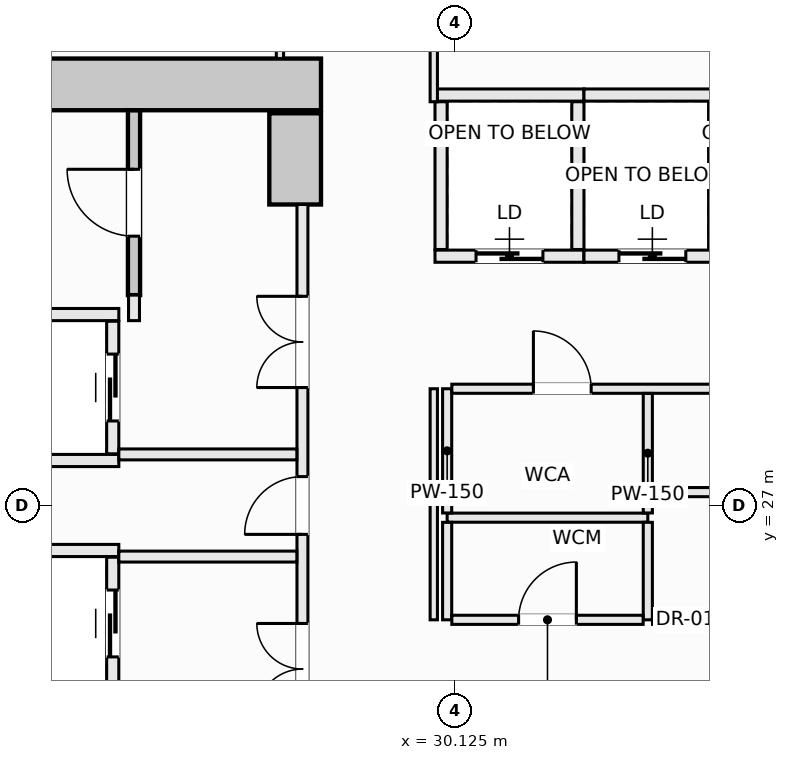
"""IFC4 building model, lengths in metres.
Left out: names, types, materials, properties, quantities, classifications, styles, units other than length and angle.
Written with IfcOpenShell. Run it as: python <this file> out.ifc"""

import sys

from ifc_helpers import new_model, si_unit, direction, frame, frame_2d, origin, place, context, subcontext, project, spatial, rectangle, extrude, element, fill, save


model = new_model("IFC4")
c1 = context("Model", 3, precision=1e-05, world=origin(), true_north=direction((0.0, 1.0)))
c2 = subcontext(c1, "Body", "Model", "MODEL_VIEW")
j1 = project(units=[si_unit("LENGTHUNIT", "METRE"), si_unit("PLANEANGLEUNIT", "RADIAN")], contexts=[c1])
p1 = place(None, origin())
s1 = spatial("IfcSite", under=j1, at=p1, CompositionType="ELEMENT")
p2 = place(p1, origin())
s2 = spatial("IfcBuilding", under=s1, at=p2, CompositionType="ELEMENT")
p3 = place(p2, frame((0.0, 0.0, 53.45)))
s3 = spatial("IfcBuildingStorey", under=s2, at=p3, CompositionType="ELEMENT", Elevation=53.45)
p4 = place(p3, frame((14.075, 33.925, -0.28), z_axis=(0.0, 0.0, 1.0), x_axis=(1.0, 0.0, 0.0)))
e1 = element("IfcWall", 1, at=p4, inside=s3, PredefinedType="SHEAR", context=c2, shape_type="SweptSolid", body=[
    extrude(rectangle(XDim=13.85, YDim=0.85, at=frame_2d((6.925, 0.0))), origin(), (0.0, 0.0, 1.0), 3.85),
])
p5 = place(p3, frame((27.5, 31.95, -0.28), z_axis=(0.0, 0.0, 1.0), x_axis=(0.0, 1.0, 0.0)))
e2 = element("IfcWall", 2, at=p5, inside=s3, PredefinedType="SHEAR", context=c2, shape_type="SweptSolid", body=[
    extrude(rectangle(XDim=1.5, YDim=0.85, at=frame_2d((0.75, 0.0))), origin(), (0.0, 0.0, 1.0), 3.85),
])
p6 = place(p3, frame((24.85, 30.46, -0.28), z_axis=(0.0, 0.0, 1.0), x_axis=(0.0, 1.0, 0.0)))
e3 = element("IfcWall", 3, at=p6, inside=s3, PredefinedType="SHEAR", context=c2, shape_type="SweptSolid", body=[
    extrude(rectangle(XDim=3.038, YDim=0.2, at=frame_2d((1.519, 0.0))), origin(), (0.0, 0.0, 1.0), 3.85),
])
p7 = place(p6, frame((0.969, 0.0, 0.28)))
e4 = element("IfcOpeningElement", 4, at=p7, cuts=e3, PredefinedType="OPENING", context=c2, shape_type="SweptSolid", body=[
    extrude(rectangle(XDim=1.1, YDim=2.15, at=frame_2d((0.55, 1.075))), frame((0.0, 0.11, 0.0), z_axis=(0.0, -1.0, 0.0), x_axis=(1.0, 0.0, 0.0)), (0.0, 0.0, 1.0), 0.22),
])
for number, where, z_axis, x_axis in (
    (5, (22.15, 30.14, 0.0), (0.0, 0.0, 1.0), (1.0, 0.0, 0.0)),
    (6, (22.15, 27.74, 0.0), (0.0, 0.0, 1.0), (1.0, 0.0, 0.0)),
):
    element("IfcWall", number, at=place(p3, frame(where, z_axis=z_axis, x_axis=x_axis)), inside=s3, PredefinedType="SOLIDWALL", context=c2, shape_type="SweptSolid", body=[
        extrude(rectangle(XDim=2.45, YDim=0.2, at=frame_2d((1.225, 0.0))), origin(), (0.0, 0.0, 1.0), 3.57),
    ])
p8 = place(p3, frame((24.5, 27.85, 0.0), z_axis=(0.0, 0.0, 1.0), x_axis=(0.0, 1.0, 0.0)))
e7 = element("IfcWall", 7, at=p8, inside=s3, PredefinedType="SOLIDWALL", context=c2, shape_type="SweptSolid", body=[
    extrude(rectangle(XDim=2.18, YDim=0.2, at=frame_2d((1.09, 0.0))), origin(), (0.0, 0.0, 1.0), 3.57),
])
p9 = place(p8, frame((0.54, 0.0, 0.0)))
e8 = element("IfcOpeningElement", 8, at=p9, cuts=e7, PredefinedType="OPENING", context=c2, shape_type="SweptSolid", body=[
    extrude(rectangle(XDim=1.1, YDim=2.2, at=frame_2d((0.55, 1.1))), frame((0.0, 0.11, 0.0), z_axis=(0.0, -1.0, 0.0), x_axis=(1.0, 0.0, 0.0)), (0.0, 0.0, 1.0), 0.22),
])
p10 = place(p3, frame((22.15, 26.26, 0.0), z_axis=(0.0, 0.0, 1.0), x_axis=(1.0, 0.0, 0.0)))
e9 = element("IfcWall", 9, at=p10, inside=s3, PredefinedType="SOLIDWALL", context=c2, shape_type="SweptSolid", body=[
    extrude(rectangle(XDim=2.45, YDim=0.2, at=frame_2d((1.225, 0.0))), origin(), (0.0, 0.0, 1.0), 3.57),
])
p11 = place(p3, frame((24.5, 23.97, 0.0), z_axis=(0.0, 0.0, 1.0), x_axis=(0.0, 1.0, 0.0)))
e10 = element("IfcWall", 10, at=p11, inside=s3, PredefinedType="SOLIDWALL", context=c2, shape_type="SweptSolid", body=[
    extrude(rectangle(XDim=2.18, YDim=0.2, at=frame_2d((1.09, 0.0))), origin(), (0.0, 0.0, 1.0), 3.57),
])
p12 = place(p11, frame((0.54, 0.0, 0.0)))
e11 = element("IfcOpeningElement", 11, at=p12, cuts=e10, PredefinedType="OPENING", context=c2, shape_type="SweptSolid", body=[
    extrude(rectangle(XDim=1.1, YDim=2.2, at=frame_2d((0.55, 1.1))), frame((0.0, 0.11, 0.0), z_axis=(0.0, -1.0, 0.0), x_axis=(1.0, 0.0, 0.0)), (0.0, 0.0, 1.0), 0.22),
])
p13 = place(p3, frame((29.8, 33.75, 0.0), z_axis=(0.0, 0.0, 1.0), x_axis=(1.0, 0.0, 0.0)))
e12 = element("IfcWall", 12, at=p13, inside=s3, PredefinedType="SOLIDWALL", context=c2, shape_type="SweptSolid", body=[
    extrude(rectangle(XDim=2.45, YDim=0.2, at=frame_2d((1.225, 0.0))), origin(), (0.0, 0.0, 1.0), 3.57),
])
p14 = place(p3, frame((29.8, 31.1, 0.0), z_axis=(0.0, 0.0, 1.0), x_axis=(1.0, 0.0, 0.0)))
e13 = element("IfcWall", 13, at=p14, inside=s3, PredefinedType="SOLIDWALL", context=c2, shape_type="SweptSolid", body=[
    extrude(rectangle(XDim=2.45, YDim=0.2, at=frame_2d((1.225, 0.0))), origin(), (0.0, 0.0, 1.0), 3.57),
])
p15 = place(p14, frame((0.675, 0.0, 0.0)))
e14 = element("IfcOpeningElement", 14, at=p15, cuts=e13, PredefinedType="OPENING", context=c2, shape_type="SweptSolid", body=[
    extrude(rectangle(XDim=1.1, YDim=2.2, at=frame_2d((0.55, 1.1))), frame((0.0, 0.11, 0.0), z_axis=(0.0, -1.0, 0.0), x_axis=(1.0, 0.0, 0.0)), (0.0, 0.0, 1.0), 0.22),
])
for number, where, z_axis, x_axis in (
    (15, (29.9, 31.21, 0.0), (0.0, 0.0, 1.0), (0.0, 1.0, 0.0)),
    (16, (32.15, 31.21, 0.0), (0.0, 0.0, 1.0), (0.0, 1.0, 0.0)),
):
    element("IfcWall", number, at=place(p3, frame(where, z_axis=z_axis, x_axis=x_axis)), inside=s3, PredefinedType="SOLIDWALL", context=c2, shape_type="SweptSolid", body=[
        extrude(rectangle(XDim=2.43, YDim=0.2, at=frame_2d((1.215, 0.0))), origin(), (0.0, 0.0, 1.0), 3.57),
    ])
p16 = place(p3, frame((32.25, 33.75, 0.0), z_axis=(0.0, 0.0, 1.0), x_axis=(1.0, 0.0, 0.0)))
e17 = element("IfcWall", 17, at=p16, inside=s3, PredefinedType="SOLIDWALL", context=c2, shape_type="SweptSolid", body=[
    extrude(rectangle(XDim=2.25, YDim=0.2, at=frame_2d((1.125, 0.0))), origin(), (0.0, 0.0, 1.0), 3.57),
])
p17 = place(p3, frame((32.25, 31.1, 0.0), z_axis=(0.0, 0.0, 1.0), x_axis=(1.0, 0.0, 0.0)))
e18 = element("IfcWall", 18, at=p17, inside=s3, PredefinedType="SOLIDWALL", context=c2, shape_type="SweptSolid", body=[
    extrude(rectangle(XDim=2.25, YDim=0.2, at=frame_2d((1.125, 0.0))), origin(), (0.0, 0.0, 1.0), 3.57),
])
p18 = place(p17, frame((0.575, 0.0, 0.0)))
e19 = element("IfcOpeningElement", 19, at=p18, cuts=e18, PredefinedType="OPENING", context=c2, shape_type="SweptSolid", body=[
    extrude(rectangle(XDim=1.1, YDim=2.2, at=frame_2d((0.55, 1.1))), frame((0.0, 0.11, 0.0), z_axis=(0.0, -1.0, 0.0), x_axis=(1.0, 0.0, 0.0)), (0.0, 0.0, 1.0), 0.22),
])
p19 = place(p3, frame((34.4, 31.21, 0.0), z_axis=(0.0, 0.0, 1.0), x_axis=(0.0, 1.0, 0.0)))
e20 = element("IfcWall", 20, at=p19, inside=s3, PredefinedType="SOLIDWALL", context=c2, shape_type="SweptSolid", body=[
    extrude(rectangle(XDim=2.43, YDim=0.2, at=frame_2d((1.215, 0.0))), origin(), (0.0, 0.0, 1.0), 3.57),
])
p20 = place(p3, frame((24.85, 30.04, 0.0), z_axis=(0.0, 0.0, 1.0), x_axis=(0.0, 1.0, 0.0)))
e21 = element("IfcWall", 21, at=p20, inside=s3, PredefinedType="SOLIDWALL", context=c2, shape_type="SweptSolid", body=[
    extrude(rectangle(XDim=0.42, YDim=0.18, at=frame_2d((0.21, 0.0))), origin(), (0.0, 0.0, 1.0), 3.57),
])
p21 = place(p3, frame((27.62, 22.05, 0.0), z_axis=(0.0, 0.0, 1.0), x_axis=(0.0, 1.0, 0.0)))
e22 = element("IfcWall", 22, at=p21, inside=s3, PredefinedType="SOLIDWALL", context=c2, shape_type="SweptSolid", body=[
    extrude(rectangle(XDim=9.9, YDim=0.18, at=frame_2d((4.95, 0.0))), origin(), (0.0, 0.0, 1.0), 2.662),
])
p22 = place(p21, frame((4.475, 0.0, 0.0)))
e23 = element("IfcOpeningElement", 23, at=p22, cuts=e22, PredefinedType="OPENING", context=c2, shape_type="SweptSolid", body=[
    extrude(rectangle(XDim=0.95, YDim=2.1, at=frame_2d((0.475, 1.05))), frame((0.0, 0.1, 0.0), z_axis=(0.0, -1.0, 0.0), x_axis=(1.0, 0.0, 0.0)), (0.0, 0.0, 1.0), 0.2),
])
p23 = place(p21, frame((6.89, 0.0, 0.0)))
e24 = element("IfcOpeningElement", 24, at=p23, cuts=e22, PredefinedType="OPENING", context=c2, shape_type="SweptSolid", body=[
    extrude(rectangle(XDim=1.5, YDim=2.2, at=frame_2d((0.75, 1.1))), frame((0.0, 0.1, 0.0), z_axis=(0.0, -1.0, 0.0), x_axis=(1.0, 0.0, 0.0)), (0.0, 0.0, 1.0), 0.2),
])
p24 = place(p21, frame((1.51, 0.0, 0.0)))
e25 = element("IfcOpeningElement", 25, at=p24, cuts=e22, PredefinedType="OPENING", context=c2, shape_type="SweptSolid", body=[
    extrude(rectangle(XDim=1.5, YDim=2.2, at=frame_2d((0.75, 1.1))), frame((0.0, 0.1, 0.0), z_axis=(0.0, -1.0, 0.0), x_axis=(1.0, 0.0, 0.0)), (0.0, 0.0, 1.0), 0.2),
])
for number, where, z_axis, x_axis in (
    (26, (24.6, 27.84, 0.0), (0.0, 0.0, 1.0), (1.0, 0.0, 0.0)),
    (27, (24.6, 26.16, 0.0), (0.0, 0.0, 1.0), (1.0, 0.0, 0.0)),
):
    element("IfcWall", number, at=place(p3, frame(where, z_axis=z_axis, x_axis=x_axis)), inside=s3, PredefinedType="SOLIDWALL", context=c2, shape_type="SweptSolid", body=[
        extrude(rectangle(XDim=2.928, YDim=0.18, at=frame_2d((1.464, 0.0))), origin(), (0.0, 0.0, 1.0), 3.57),
    ])
p25 = place(p3, frame((30.0, 26.8, 0.0), z_axis=(0.0, 0.0, 1.0), x_axis=(1.0, 0.0, 0.0)))
e28 = element("IfcWall", 28, at=p25, inside=s3, PredefinedType="PARTITIONING", context=c2, shape_type="SweptSolid", body=[
    extrude(rectangle(XDim=3.3, YDim=0.15, at=frame_2d((1.65, 0.0))), origin(), (0.0, 0.0, 1.0), 3.57),
])
p26 = place(p3, frame((30.0, 25.12, 0.0), z_axis=(0.0, 0.0, 1.0), x_axis=(0.0, 1.0, 0.0)))
e29 = element("IfcWall", 29, at=p26, inside=s3, PredefinedType="PARTITIONING", context=c2, shape_type="SweptSolid", body=[
    extrude(rectangle(XDim=1.603, YDim=0.15, at=frame_2d((0.801, 0.0))), origin(), (0.0, 0.0, 1.0), 3.57),
])
p27 = place(p3, frame((30.0, 26.877, 0.0), z_axis=(0.0, 0.0, 1.0), x_axis=(0.0, 1.0, 0.0)))
e30 = element("IfcWall", 30, at=p27, inside=s3, PredefinedType="PARTITIONING", context=c2, shape_type="SweptSolid", body=[
    extrude(rectangle(XDim=2.043, YDim=0.15, at=frame_2d((1.021, 0.0))), origin(), (0.0, 0.0, 1.0), 3.57),
])
p28 = place(p3, frame((30.077, 28.92, 0.0), z_axis=(0.0, 0.0, 1.0), x_axis=(1.0, 0.0, 0.0)))
e31 = element("IfcWall", 31, at=p28, inside=s3, PredefinedType="PARTITIONING", context=c2, shape_type="SweptSolid", body=[
    extrude(rectangle(XDim=13.673, YDim=0.15, at=frame_2d((6.836, 0.0))), origin(), (0.0, 0.0, 1.0), 3.57),
])
p29 = place(p28, frame((1.342, 0.0, 0.0)))
e32 = element("IfcOpeningElement", 32, at=p29, cuts=e31, PredefinedType="OPENING", context=c2, shape_type="SweptSolid", body=[
    extrude(rectangle(XDim=0.95, YDim=2.1, at=frame_2d((0.475, 1.05))), frame((0.0, 0.085, 0.0), z_axis=(0.0, -1.0, 0.0), x_axis=(1.0, 0.0, 0.0)), (0.0, 0.0, 1.0), 0.17),
])
p30 = place(p28, frame((5.498, 0.0, 0.0)))
e33 = element("IfcOpeningElement", 33, at=p30, cuts=e31, PredefinedType="OPENING", context=c2, shape_type="SweptSolid", body=[
    extrude(rectangle(XDim=0.95, YDim=2.1, at=frame_2d((0.475, 1.05))), frame((0.0, 0.085, 0.0), z_axis=(0.0, -1.0, 0.0), x_axis=(1.0, 0.0, 0.0)), (0.0, 0.0, 1.0), 0.17),
])
p31 = place(p28, frame((10.518, 0.0, 0.0)))
e34 = element("IfcOpeningElement", 34, at=p31, cuts=e31, PredefinedType="OPENING", context=c2, shape_type="SweptSolid", body=[
    extrude(rectangle(XDim=0.95, YDim=2.1, at=frame_2d((0.475, 1.05))), frame((0.0, 0.085, 0.0), z_axis=(0.0, -1.0, 0.0), x_axis=(1.0, 0.0, 0.0)), (0.0, 0.0, 1.0), 0.17),
])
p32 = place(p3, frame((33.3, 25.12, 0.0), z_axis=(0.0, 0.0, 1.0), x_axis=(0.0, 1.0, 0.0)))
e35 = element("IfcWall", 35, at=p32, inside=s3, PredefinedType="PARTITIONING", context=c2, shape_type="SweptSolid", body=[
    extrude(rectangle(XDim=1.603, YDim=0.15, at=frame_2d((0.801, 0.0))), origin(), (0.0, 0.0, 1.0), 3.57),
])
p33 = place(p3, frame((33.3, 26.877, 0.0), z_axis=(0.0, 0.0, 1.0), x_axis=(0.0, 1.0, 0.0)))
e36 = element("IfcWall", 36, at=p33, inside=s3, PredefinedType="PARTITIONING", context=c2, shape_type="SweptSolid", body=[
    extrude(rectangle(XDim=1.966, YDim=0.15, at=frame_2d((0.983, 0.0))), origin(), (0.0, 0.0, 1.0), 3.57),
])
p34 = place(p3, frame((30.077, 25.12, 0.0), z_axis=(0.0, 0.0, 1.0), x_axis=(1.0, 0.0, 0.0)))
e37 = element("IfcWall", 37, at=p34, inside=s3, PredefinedType="PARTITIONING", context=c2, shape_type="SweptSolid", body=[
    extrude(rectangle(XDim=3.146, YDim=0.15, at=frame_2d((1.573, 0.0))), origin(), (0.0, 0.0, 1.0), 3.57),
])
p35 = place(p34, frame((1.098, 0.0, 0.0)))
e38 = element("IfcOpeningElement", 38, at=p35, cuts=e37, PredefinedType="OPENING", context=c2, shape_type="SweptSolid", body=[
    extrude(rectangle(XDim=0.95, YDim=2.1, at=frame_2d((0.475, 1.05))), frame((0.0, 0.085, 0.0), z_axis=(0.0, -1.0, 0.0), x_axis=(1.0, 0.0, 0.0)), (0.0, 0.0, 1.0), 0.17),
])
p36 = place(p3, frame((33.377, 25.12, 0.0), z_axis=(0.0, 0.0, 1.0), x_axis=(1.0, 0.0, 0.0)))
e39 = element("IfcWall", 39, at=p36, inside=s3, PredefinedType="PARTITIONING", context=c2, shape_type="SweptSolid", body=[
    extrude(rectangle(XDim=10.373, YDim=0.15, at=frame_2d((5.187, 0.0))), origin(), (0.0, 0.0, 1.0), 3.57),
])
p37 = place(p36, frame((2.441, 0.0, 0.0)))
e40 = element("IfcOpeningElement", 40, at=p37, cuts=e39, PredefinedType="OPENING", context=c2, shape_type="SweptSolid", body=[
    extrude(rectangle(XDim=0.95, YDim=2.1, at=frame_2d((0.475, 1.05))), frame((0.0, 0.085, 0.0), z_axis=(0.0, -1.0, 0.0), x_axis=(1.0, 0.0, 0.0)), (0.0, 0.0, 1.0), 0.17),
])
p38 = place(p3, frame((33.377, 27.22, 0.0), z_axis=(0.0, 0.0, 1.0), x_axis=(1.0, 0.0, 0.0)))
e41 = element("IfcWall", 41, at=p38, inside=s3, PredefinedType="PARTITIONING", context=c2, shape_type="SweptSolid", body=[
    extrude(rectangle(XDim=5.423, YDim=0.15, at=frame_2d((2.711, 0.0))), origin(), (0.0, 0.0, 1.0), 3.57),
])
p39 = place(p3, frame((27.25, 34.352, 0.0), z_axis=(0.0, 0.0, 1.0), x_axis=(0.0, 1.0, 0.0)))
e42 = element("IfcWall", 42, at=p39, inside=s3, PredefinedType="PARTITIONING", context=c2, shape_type="SweptSolid", body=[
    extrude(rectangle(XDim=0.606, YDim=0.12, at=frame_2d((0.303, 0.0))), origin(), (0.0, 0.0, 1.0), 3.57),
])
p40 = place(p3, frame((29.78, 25.12, 0.0), z_axis=(0.0, 0.0, 1.0), x_axis=(0.0, 1.0, 0.0)))
e43 = element("IfcWall", 43, at=p40, inside=s3, PredefinedType="PARTITIONING", context=c2, shape_type="SweptSolid", body=[
    extrude(rectangle(XDim=3.8, YDim=0.12, at=frame_2d((1.9, 0.0))), origin(), (0.0, 0.0, 1.0), 3.57),
])
p41 = place(p3, frame((29.78, 33.64, 0.0), z_axis=(0.0, 0.0, 1.0), x_axis=(0.0, 1.0, 0.0)))
e44 = element("IfcWall", 44, at=p41, inside=s3, PredefinedType="PARTITIONING", context=c2, shape_type="SweptSolid", body=[
    extrude(rectangle(XDim=4.798, YDim=0.12, at=frame_2d((2.399, 0.0))), origin(), (0.0, 0.0, 1.0), 3.57),
])
p42 = place(p3, frame((31.752, 47.826, 0.0), z_axis=(0.0, 0.0, 1.0), x_axis=(0.668565546791, -0.743653218674, 0.0)))
e45 = element("IfcWall", 45, at=p42, inside=s3, PredefinedType="PARTITIONING", context=c2, shape_type="SweptSolid", body=[
    extrude(rectangle(XDim=19.941, YDim=0.12, at=frame_2d((9.97, 0.0))), origin(), (0.0, 0.0, 1.0), 3.093),
])
p43 = place(p7, origin())
e46 = element("IfcDoor", 46, at=p43, inside=s3, OperationType="SINGLE_SWING_RIGHT", PredefinedType="DOOR", context=c2, shape_type="SweptSolid", body=[
    extrude(rectangle(XDim=1.1, YDim=2.15, at=frame_2d((0.55, 1.075))), frame((0.0, 0.025, 0.0), z_axis=(0.0, -1.0, 0.0), x_axis=(1.0, 0.0, 0.0)), (0.0, 0.0, 1.0), 0.05),
])
fill(e4, e46)
p44 = place(p9, origin())
e47 = element("IfcDoor", 47, at=p44, inside=s3, OperationType="SLIDING_TO_LEFT", PredefinedType="DOOR", context=c2, shape_type="SweptSolid", body=[
    extrude(rectangle(XDim=1.1, YDim=2.2, at=frame_2d((0.55, 1.1))), frame((0.0, 0.025, 0.0), z_axis=(0.0, -1.0, 0.0), x_axis=(1.0, 0.0, 0.0)), (0.0, 0.0, 1.0), 0.05),
])
fill(e8, e47)
p45 = place(p12, origin())
e48 = element("IfcDoor", 48, at=p45, inside=s3, OperationType="SLIDING_TO_LEFT", PredefinedType="DOOR", context=c2, shape_type="SweptSolid", body=[
    extrude(rectangle(XDim=1.1, YDim=2.2, at=frame_2d((0.55, 1.1))), frame((0.0, 0.025, 0.0), z_axis=(0.0, -1.0, 0.0), x_axis=(1.0, 0.0, 0.0)), (0.0, 0.0, 1.0), 0.05),
])
fill(e11, e48)
p46 = place(p15, origin())
e49 = element("IfcDoor", 49, at=p46, inside=s3, OperationType="SLIDING_TO_LEFT", PredefinedType="DOOR", context=c2, shape_type="SweptSolid", body=[
    extrude(rectangle(XDim=1.1, YDim=2.2, at=frame_2d((0.55, 1.1))), frame((0.0, 0.025, 0.0), z_axis=(0.0, -1.0, 0.0), x_axis=(1.0, 0.0, 0.0)), (0.0, 0.0, 1.0), 0.05),
])
fill(e14, e49)
p47 = place(p18, origin())
e50 = element("IfcDoor", 50, at=p47, inside=s3, OperationType="SLIDING_TO_LEFT", PredefinedType="DOOR", context=c2, shape_type="SweptSolid", body=[
    extrude(rectangle(XDim=1.1, YDim=2.2, at=frame_2d((0.55, 1.1))), frame((0.0, 0.025, 0.0), z_axis=(0.0, -1.0, 0.0), x_axis=(1.0, 0.0, 0.0)), (0.0, 0.0, 1.0), 0.05),
])
fill(e19, e50)
p48 = place(p22, origin())
e51 = element("IfcDoor", 51, at=p48, inside=s3, OperationType="SINGLE_SWING_LEFT", PredefinedType="DOOR", context=c2, shape_type="SweptSolid", body=[
    extrude(rectangle(XDim=0.95, YDim=2.1, at=frame_2d((0.475, 1.05))), frame((0.0, 0.025, 0.0), z_axis=(0.0, -1.0, 0.0), x_axis=(1.0, 0.0, 0.0)), (0.0, 0.0, 1.0), 0.05),
])
fill(e23, e51)
p49 = place(p23, origin())
e52 = element("IfcDoor", 52, at=p49, inside=s3, OperationType="DOUBLE_DOOR_SINGLE_SWING", PredefinedType="DOOR", context=c2, shape_type="SweptSolid", body=[
    extrude(rectangle(XDim=1.5, YDim=2.2, at=frame_2d((0.75, 1.1))), frame((0.0, 0.025, 0.0), z_axis=(0.0, -1.0, 0.0), x_axis=(1.0, 0.0, 0.0)), (0.0, 0.0, 1.0), 0.05),
])
fill(e24, e52)
p50 = place(p24, origin())
e53 = element("IfcDoor", 53, at=p50, inside=s3, OperationType="DOUBLE_DOOR_SINGLE_SWING", PredefinedType="DOOR", context=c2, shape_type="SweptSolid", body=[
    extrude(rectangle(XDim=1.5, YDim=2.2, at=frame_2d((0.75, 1.1))), frame((0.0, 0.025, 0.0), z_axis=(0.0, -1.0, 0.0), x_axis=(1.0, 0.0, 0.0)), (0.0, 0.0, 1.0), 0.05),
])
fill(e25, e53)
p51 = place(p29, origin())
e54 = element("IfcDoor", 54, at=p51, inside=s3, OperationType="SINGLE_SWING_LEFT", PredefinedType="DOOR", context=c2, shape_type="SweptSolid", body=[
    extrude(rectangle(XDim=0.95, YDim=2.1, at=frame_2d((0.475, 1.05))), frame((0.0, 0.025, 0.0), z_axis=(0.0, -1.0, 0.0), x_axis=(1.0, 0.0, 0.0)), (0.0, 0.0, 1.0), 0.05),
])
fill(e32, e54)
p52 = place(p35, origin())
e55 = element("IfcDoor", 55, at=p52, inside=s3, OperationType="SINGLE_SWING_RIGHT", PredefinedType="DOOR", context=c2, shape_type="SweptSolid", body=[
    extrude(rectangle(XDim=0.95, YDim=2.1, at=frame_2d((0.475, 1.05))), frame((0.0, 0.025, 0.0), z_axis=(0.0, -1.0, 0.0), x_axis=(1.0, 0.0, 0.0)), (0.0, 0.0, 1.0), 0.05),
])
fill(e38, e55)
save(model, sys.argv[1])
